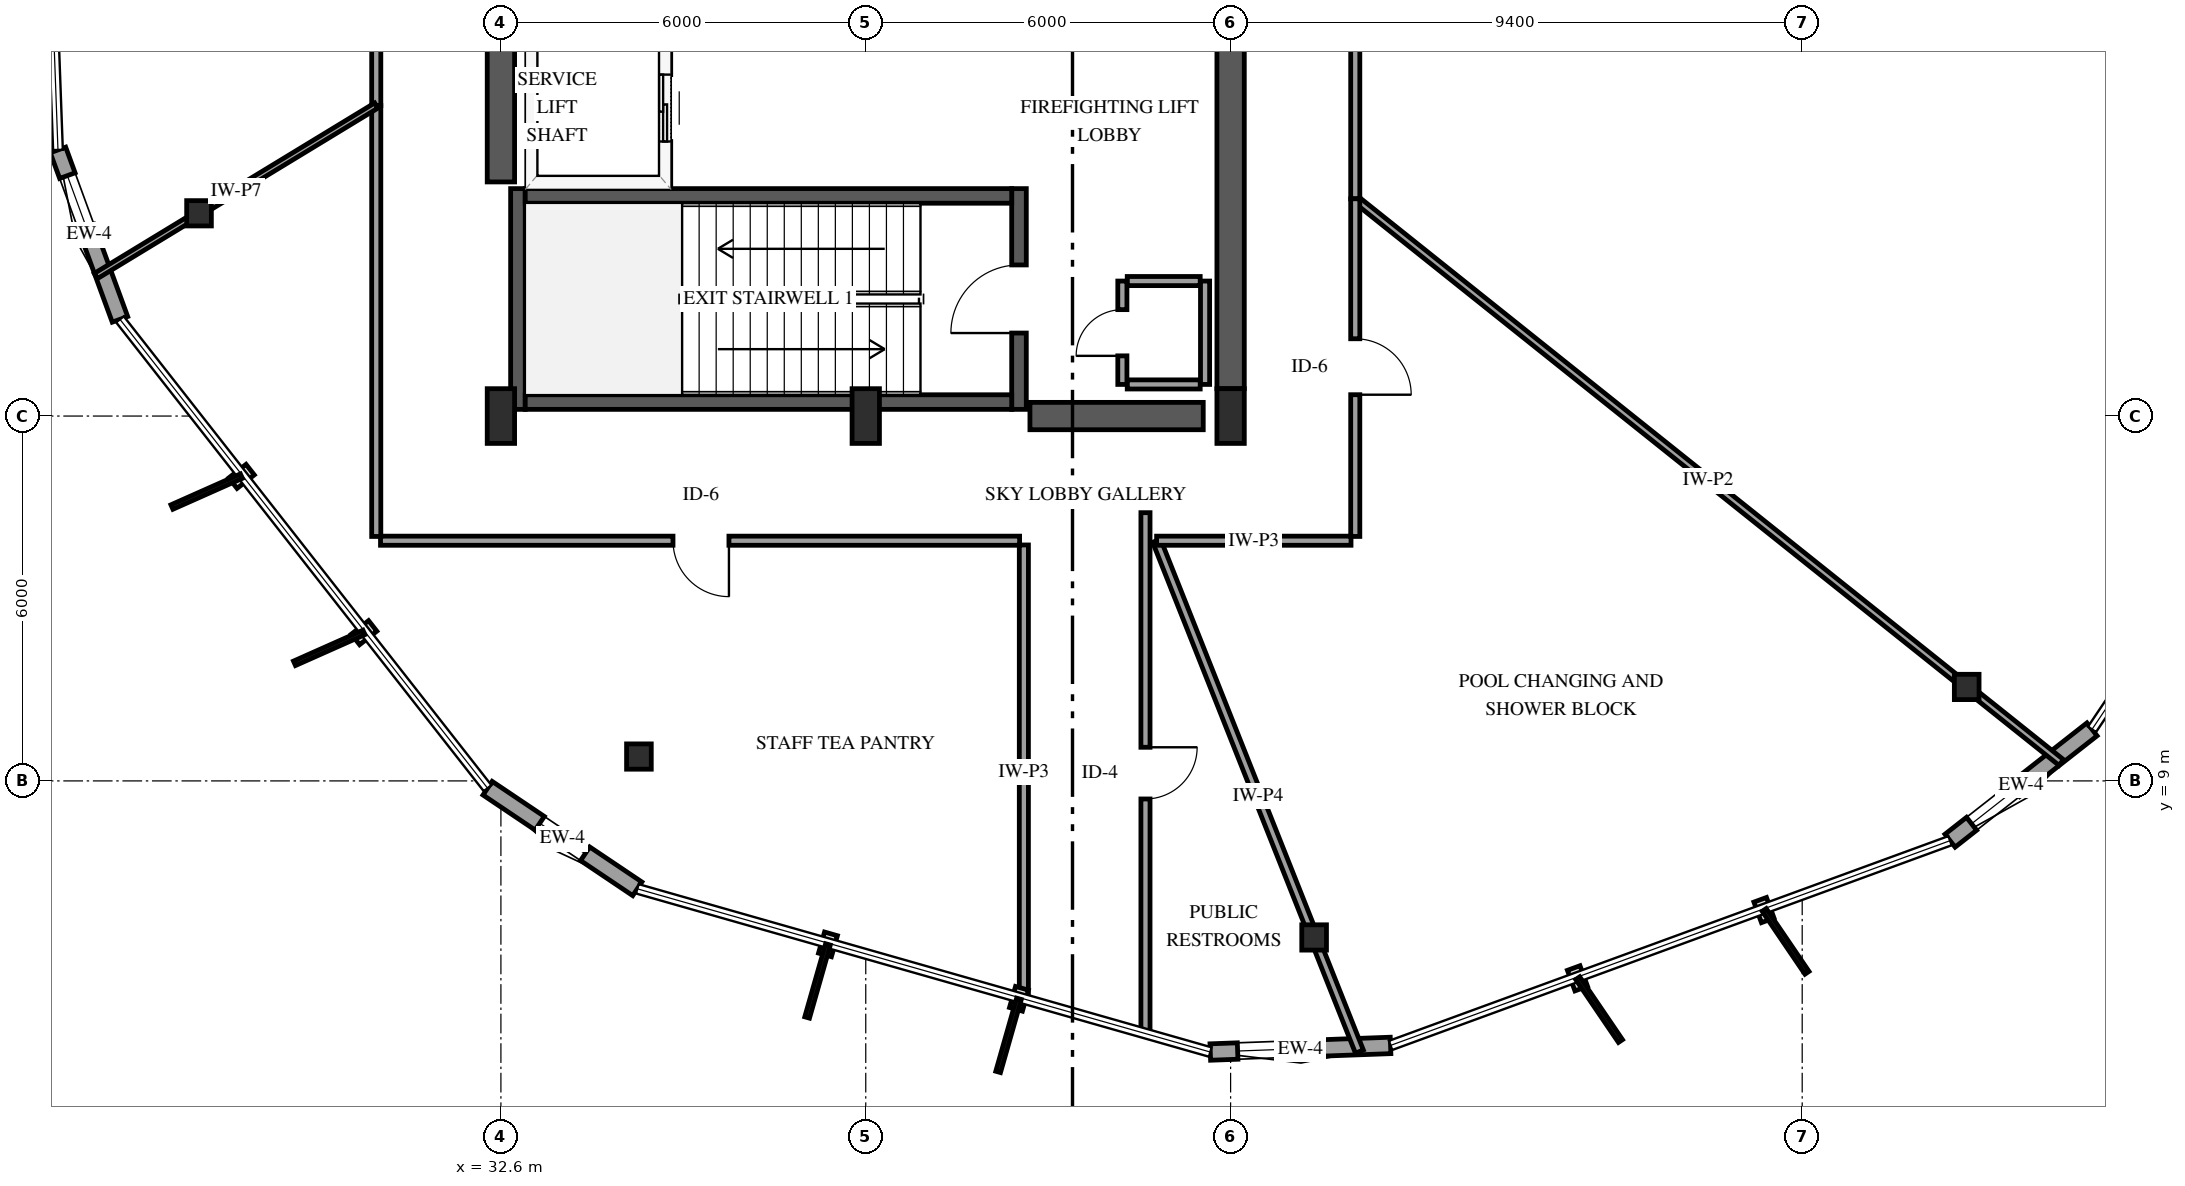
"""IFC4 building model, lengths in metres.
Left out: names, types, materials, properties, quantities, classifications, styles, units other than length and angle.
Written with IfcOpenShell. Run it as: python <this file> out.ifc"""

import sys

from ifc_helpers import new_model, si_unit, direction, frame, frame_2d, origin, origin_2d, place, context, subcontext, project, spatial, rectangle, i_section, extrude, element, fill, save


model = new_model("IFC4")
c1 = context("Model", 3, precision=1e-05, world=origin(), true_north=direction((0.0, 1.0)))
c2 = subcontext(c1, "Body", "Model", "MODEL_VIEW")
j1 = project(units=[si_unit("LENGTHUNIT", "METRE"), si_unit("PLANEANGLEUNIT", "RADIAN")], contexts=[c1])
p1 = place(None, origin())
s1 = spatial("IfcSite", under=j1, at=p1, CompositionType="ELEMENT")
p2 = place(p1, origin())
s2 = spatial("IfcBuilding", under=s1, at=p2, CompositionType="ELEMENT")
p3 = place(p2, frame((0.0, 0.0, 237.4)))
s3 = spatial("IfcBuildingStorey", under=s2, at=p3, CompositionType="ELEMENT", Elevation=237.4)
p4 = place(p3, frame((32.88, 15.11, 0.0), z_axis=(0.0, 0.0, 1.0), x_axis=(0.0, 1.0, 0.0)))
e1 = element("IfcWall", 1, at=p4, inside=s3, PredefinedType="SHEAR", context=c2, shape_type="SweptSolid", body=[
    extrude(rectangle(XDim=3.63, YDim=0.24, at=frame_2d((1.815, 0.0))), origin(), (0.0, 0.0, 1.0), 5.1),
])
p5 = place(p3, frame((41.12, 15.11, 0.0), z_axis=(0.0, 0.0, 1.0), x_axis=(0.0, 1.0, 0.0)))
e2 = element("IfcWall", 2, at=p5, inside=s3, PredefinedType="SHEAR", context=c2, shape_type="SweptSolid", body=[
    extrude(rectangle(XDim=3.63, YDim=0.24, at=frame_2d((1.815, 0.0))), origin(), (0.0, 0.0, 1.0), 5.1),
])
p6 = place(p5, frame((1.255, 0.0, 0.0)))
e3 = element("IfcOpeningElement", 3, at=p6, cuts=e2, PredefinedType="OPENING", context=c2, shape_type="SweptSolid", body=[
    extrude(rectangle(XDim=1.12, YDim=2.15, at=frame_2d((0.56, 1.075))), frame((0.0, 0.13, 0.0), z_axis=(0.0, -1.0, 0.0), x_axis=(1.0, 0.0, 0.0)), (0.0, 0.0, 1.0), 0.26),
])
for number, where, z_axis, x_axis in (
    (4, (33.0, 15.23, 0.0), (0.0, 0.0, 1.0), (1.0, 0.0, 0.0)),
    (5, (33.0, 18.62, 0.0), (0.0, 0.0, 1.0), (1.0, 0.0, 0.0)),
):
    element("IfcWall", number, at=place(p3, frame(where, z_axis=z_axis, x_axis=x_axis)), inside=s3, PredefinedType="SHEAR", context=c2, shape_type="SweptSolid", body=[
        extrude(rectangle(XDim=8.0, YDim=0.24, at=frame_2d((4.0, 0.0))), origin(), (0.0, 0.0, 1.0), 5.1),
    ])
p7 = place(p3, frame((32.6, 18.85, 0.0), z_axis=(0.0, 0.0, 1.0), x_axis=(0.0, 1.0, 0.0)))
e6 = element("IfcWall", 6, at=p7, inside=s3, PredefinedType="SHEAR", context=c2, shape_type="SweptSolid", body=[
    extrude(rectangle(XDim=12.3, YDim=0.45, at=frame_2d((6.15, 0.0))), origin(), (0.0, 0.0, 1.0), 5.1),
])
p8 = place(p3, frame((41.3, 15.0, 0.0), z_axis=(0.0, 0.0, 1.0), x_axis=(1.0, 0.0, 0.0)))
e7 = element("IfcWall", 7, at=p8, inside=s3, PredefinedType="SHEAR", context=c2, shape_type="SweptSolid", body=[
    extrude(rectangle(XDim=2.85, YDim=0.45, at=frame_2d((1.425, 0.0))), origin(), (0.0, 0.0, 1.0), 5.1),
])
p9 = place(p3, frame((44.6, 15.45, 0.0), z_axis=(0.0, 0.0, 1.0), x_axis=(0.0, 1.0, 0.0)))
e8 = element("IfcWall", 8, at=p9, inside=s3, PredefinedType="SHEAR", context=c2, shape_type="SweptSolid", body=[
    extrude(rectangle(XDim=6.35, YDim=0.45, at=frame_2d((3.175, 0.0))), origin(), (0.0, 0.0, 1.0), 5.1),
])
for number, where, z_axis, x_axis in (
    (9, (32.6, 15.0, 0.0), (0.0, 0.0, 1.0), (1.0, 0.0, 0.0)),
    (10, (38.6, 15.0, 0.0), (0.0, 0.0, 1.0), (1.0, 0.0, 0.0)),
    (11, (44.6, 15.0, 0.0), (0.0, 0.0, 1.0), (1.0, 0.0, 0.0)),
):
    element("IfcColumn", number, at=place(p3, frame(where, z_axis=z_axis, x_axis=x_axis)), inside=s3, PredefinedType="PILASTER", context=c2, shape_type="SweptSolid", body=[
        extrude(rectangle(XDim=0.45, YDim=0.9, at=origin_2d()), origin(), (0.0, 0.0, 1.0), 4.8),
    ])
for number, where, z_axis, x_axis in (
    (12, (27.635, 18.334, 0.0), (0.0, 0.0, 1.0), (1.0, 0.0, 0.0)),
    (13, (34.87, 9.401, 0.0), (0.0, 0.0, 1.0), (1.0, 0.0, 0.0)),
    (14, (45.973, 6.426, 0.0), (0.0, 0.0, 1.0), (1.0, 0.0, 0.0)),
    (15, (56.705, 10.545, 0.0), (0.0, 0.0, 1.0), (1.0, 0.0, 0.0)),
):
    element("IfcColumn", number, at=place(p3, frame(where, z_axis=z_axis, x_axis=x_axis)), inside=s3, PredefinedType="COLUMN", context=c2, shape_type="SweptSolid", body=[
        extrude(i_section(OverallWidth=0.406, OverallDepth=0.416, WebThickness=0.03, FlangeThickness=0.048, FilletRadius=0.038, at=origin_2d()), origin(), (0.0, 0.0, 1.0), 4.8),
    ])
p10 = place(p3, frame((25.316, 19.376, 0.0), z_axis=(0.0, 0.0, 1.0), x_axis=(0.343572680233, -0.939126090255, 0.0)))
e16 = element("IfcWall", 16, at=p10, inside=s3, PredefinedType="SOLIDWALL", context=c2, shape_type="SweptSolid", body=[
    extrude(rectangle(XDim=2.967, YDim=0.27, at=frame_2d((1.483, 0.0))), origin(), (0.0, 0.0, 1.0), 4.179),
])
p11 = place(p10, frame((0.45, 0.0, 0.75)))
e17 = element("IfcOpeningElement", 17, at=p11, cuts=e16, PredefinedType="OPENING", context=c2, shape_type="SweptSolid", body=[
    extrude(rectangle(XDim=0.9, YDim=1.5, at=frame_2d((0.45, 0.75))), frame((0.0, 0.145, 0.0), z_axis=(0.0, -1.0, 0.0), x_axis=(1.0, 0.0, 0.0)), (0.0, 0.0, 1.0), 0.29),
])
p12 = place(p3, frame((32.381, 8.88, 0.0), z_axis=(0.0, 0.0, 1.0), x_axis=(0.830006141752, -0.557754251131, 0.0)))
e18 = element("IfcWall", 18, at=p12, inside=s3, PredefinedType="SOLIDWALL", context=c2, shape_type="SweptSolid", body=[
    extrude(rectangle(XDim=2.967, YDim=0.27, at=frame_2d((1.483, 0.0))), origin(), (0.0, 0.0, 1.0), 4.179),
])
p13 = place(p12, frame((1.033, 0.0, 0.75)))
e19 = element("IfcOpeningElement", 19, at=p13, cuts=e18, PredefinedType="OPENING", context=c2, shape_type="SweptSolid", body=[
    extrude(rectangle(XDim=0.9, YDim=1.5, at=frame_2d((0.45, 0.75))), frame((0.0, 0.145, 0.0), z_axis=(0.0, -1.0, 0.0), x_axis=(1.0, 0.0, 0.0)), (0.0, 0.0, 1.0), 0.29),
])
p14 = place(p3, frame((44.266, 4.541, 0.0), z_axis=(0.0, 0.0, 1.0), x_axis=(0.999329187927, 0.036622044686, 0.0)))
e20 = element("IfcWall", 20, at=p14, inside=s3, PredefinedType="SOLIDWALL", context=c2, shape_type="SweptSolid", body=[
    extrude(rectangle(XDim=2.967, YDim=0.27, at=frame_2d((1.483, 0.0))), origin(), (0.0, 0.0, 1.0), 4.179),
])
p15 = place(p14, frame((0.45, 0.0, 0.75)))
e21 = element("IfcOpeningElement", 21, at=p15, cuts=e20, PredefinedType="OPENING", context=c2, shape_type="SweptSolid", body=[
    extrude(rectangle(XDim=0.9, YDim=1.5, at=frame_2d((0.45, 0.75))), frame((0.0, 0.145, 0.0), z_axis=(0.0, -1.0, 0.0), x_axis=(1.0, 0.0, 0.0)), (0.0, 0.0, 1.0), 0.29),
])
p16 = place(p3, frame((56.431, 8.017, 0.0), z_axis=(0.0, 0.0, 1.0), x_axis=(0.78691766732, 0.617058007694, 0.0)))
e22 = element("IfcWall", 22, at=p16, inside=s3, PredefinedType="SOLIDWALL", context=c2, shape_type="SweptSolid", body=[
    extrude(rectangle(XDim=2.967, YDim=0.27, at=frame_2d((1.483, 0.0))), origin(), (0.0, 0.0, 1.0), 4.179),
])
p17 = place(p16, frame((0.45, 0.0, 0.75)))
e23 = element("IfcOpeningElement", 23, at=p17, cuts=e22, PredefinedType="OPENING", context=c2, shape_type="SweptSolid", body=[
    extrude(rectangle(XDim=0.9, YDim=1.5, at=frame_2d((0.45, 0.75))), frame((0.0, 0.145, 0.0), z_axis=(0.0, -1.0, 0.0), x_axis=(1.0, 0.0, 0.0)), (0.0, 0.0, 1.0), 0.29),
])
p18 = place(p3, frame((35.3, 18.79, 0.0), z_axis=(0.0, 0.0, 1.0), x_axis=(0.0, 1.0, 0.0)))
e24 = element("IfcWall", 24, at=p18, inside=s3, PredefinedType="SOLIDWALL", context=c2, shape_type="SweptSolid", body=[
    extrude(rectangle(XDim=2.55, YDim=0.185, at=frame_2d((1.275, 0.0))), origin(), (0.0, 0.0, 1.0), 4.8),
])
p19 = place(p18, frame((0.725, 0.0, 0.0)))
e25 = element("IfcOpeningElement", 25, at=p19, cuts=e24, PredefinedType="OPENING", context=c2, shape_type="SweptSolid", body=[
    extrude(rectangle(XDim=1.1, YDim=2.15, at=frame_2d((0.55, 1.075))), frame((0.0, 0.103, 0.0), z_axis=(0.0, -1.0, 0.0), x_axis=(1.0, 0.0, 0.0)), (0.0, 0.0, 1.0), 0.205),
])
for number, where, z_axis, x_axis in (
    (26, (42.9, 15.52, 0.0), (0.0, 0.0, 1.0), (1.0, 0.0, 0.0)),
    (27, (42.9, 17.22, 0.0), (0.0, 0.0, 1.0), (1.0, 0.0, 0.0)),
):
    element("IfcWall", number, at=place(p3, frame(where, z_axis=z_axis, x_axis=x_axis)), inside=s3, PredefinedType="PARTITIONING", context=c2, shape_type="SweptSolid", body=[
        extrude(rectangle(XDim=1.2, YDim=0.15, at=frame_2d((0.6, 0.0))), origin(), (0.0, 0.0, 1.0), 4.8),
    ])
p20 = place(p3, frame((44.18, 15.52, 0.0), z_axis=(0.0, 0.0, 1.0), x_axis=(0.0, 1.0, 0.0)))
e28 = element("IfcWall", 28, at=p20, inside=s3, PredefinedType="PARTITIONING", context=c2, shape_type="SweptSolid", body=[
    extrude(rectangle(XDim=1.7, YDim=0.15, at=frame_2d((0.85, 0.0))), origin(), (0.0, 0.0, 1.0), 4.8),
])
p21 = place(p3, frame((42.82, 15.52, 0.0), z_axis=(0.0, 0.0, 1.0), x_axis=(0.0, 1.0, 0.0)))
e29 = element("IfcWall", 29, at=p21, inside=s3, PredefinedType="PARTITIONING", context=c2, shape_type="SweptSolid", body=[
    extrude(rectangle(XDim=1.7, YDim=0.15, at=frame_2d((0.85, 0.0))), origin(), (0.0, 0.0, 1.0), 4.8),
])
p22 = place(p21, frame((0.47, 0.0, 0.0)))
e30 = element("IfcOpeningElement", 30, at=p22, cuts=e29, PredefinedType="OPENING", context=c2, shape_type="SweptSolid", body=[
    extrude(rectangle(XDim=0.76, YDim=2.0, at=frame_2d((0.38, 1.0))), frame((0.0, 0.085, 0.0), z_axis=(0.0, -1.0, 0.0), x_axis=(1.0, 0.0, 0.0)), (0.0, 0.0, 1.0), 0.17),
])
p23 = place(p3, frame((30.55, 20.106, 0.0), z_axis=(0.0, 0.0, 1.0), x_axis=(0.0, 1.0, 0.0)))
e31 = element("IfcWall", 31, at=p23, inside=s3, PredefinedType="PARTITIONING", context=c2, shape_type="SweptSolid", body=[
    extrude(rectangle(XDim=16.874, YDim=0.15, at=frame_2d((8.437, 0.0))), origin(), (0.0, 0.0, 1.0), 4.8),
])
p24 = place(p23, frame((7.962, 0.0, 0.0)))
e32 = element("IfcOpeningElement", 32, at=p24, cuts=e31, PredefinedType="OPENING", context=c2, shape_type="SweptSolid", body=[
    extrude(rectangle(XDim=0.92, YDim=2.12, at=frame_2d((0.46, 1.06))), frame((0.0, 0.085, 0.0), z_axis=(0.0, -1.0, 0.0), x_axis=(1.0, 0.0, 0.0)), (0.0, 0.0, 1.0), 0.17),
])
p25 = place(p3, frame((46.65, 18.573, 0.0), z_axis=(0.0, 0.0, 1.0), x_axis=(0.781461641281, -0.623953286078, 0.0)))
e33 = element("IfcWall", 33, at=p25, inside=s3, PredefinedType="PARTITIONING", context=c2, shape_type="SweptSolid", body=[
    extrude(rectangle(XDim=14.857, YDim=0.12, at=frame_2d((7.428, 0.0))), origin(), (0.0, 0.0, 1.0), 3.09),
])
p26 = place(p3, frame((41.13, 12.95, 0.0), z_axis=(0.0, 0.0, 1.0), x_axis=(-1.0, 0.0, 0.0)))
e34 = element("IfcWall", 34, at=p26, inside=s3, PredefinedType="PARTITIONING", context=c2, shape_type="SweptSolid", body=[
    extrude(rectangle(XDim=10.51, YDim=0.15, at=frame_2d((5.255, 0.0))), origin(), (0.0, 0.0, 1.0), 4.8),
])
p27 = place(p26, frame((4.78, 0.0, 0.0)))
e35 = element("IfcOpeningElement", 35, at=p27, cuts=e34, PredefinedType="OPENING", context=c2, shape_type="SweptSolid", body=[
    extrude(rectangle(XDim=0.92, YDim=2.12, at=frame_2d((0.46, 1.06))), frame((0.0, 0.085, 0.0), z_axis=(0.0, -1.0, 0.0), x_axis=(1.0, 0.0, 0.0)), (0.0, 0.0, 1.0), 0.17),
])
p28 = place(p3, frame((43.383, 12.95, 0.0), z_axis=(0.0, 0.0, 1.0), x_axis=(0.368967753702, -0.92944219655, 0.0)))
e36 = element("IfcWall", 36, at=p28, inside=s3, PredefinedType="PARTITIONING", context=c2, shape_type="SweptSolid", body=[
    extrude(rectangle(XDim=9.039, YDim=0.14, at=frame_2d((4.519, 0.0))), origin(), (0.0, 0.0, 1.0), 3.09),
])
p29 = place(p3, frame((46.65, 27.258, 0.0), z_axis=(0.0, 0.0, 1.0), x_axis=(0.0, -1.0, 0.0)))
e37 = element("IfcWall", 37, at=p29, inside=s3, PredefinedType="PARTITIONING", context=c2, shape_type="SweptSolid", body=[
    extrude(rectangle(XDim=8.685, YDim=0.15, at=frame_2d((4.343, 0.0))), origin(), (0.0, 0.0, 1.0), 4.8),
])
p30 = place(p29, frame((3.867, 0.0, 0.0)))
e38 = element("IfcOpeningElement", 38, at=p30, cuts=e37, PredefinedType="OPENING", context=c2, shape_type="SweptSolid", body=[
    extrude(rectangle(XDim=0.92, YDim=2.12, at=frame_2d((0.46, 1.06))), frame((0.0, 0.085, 0.0), z_axis=(0.0, -1.0, 0.0), x_axis=(1.0, 0.0, 0.0)), (0.0, 0.0, 1.0), 0.17),
])
p31 = place(p3, frame((41.2, 5.415, 0.0), z_axis=(0.0, 0.0, 1.0), x_axis=(0.0, 1.0, 0.0)))
e39 = element("IfcWall", 39, at=p31, inside=s3, PredefinedType="PARTITIONING", context=c2, shape_type="SweptSolid", body=[
    extrude(rectangle(XDim=7.465, YDim=0.15, at=frame_2d((3.732, 0.0))), origin(), (0.0, 0.0, 1.0), 4.8),
])
p32 = place(p3, frame((30.55, 13.02, 0.0), z_axis=(0.0, 0.0, 1.0), x_axis=(0.0, 1.0, 0.0)))
e40 = element("IfcWall", 40, at=p32, inside=s3, PredefinedType="PARTITIONING", context=c2, shape_type="SweptSolid", body=[
    extrude(rectangle(XDim=7.086, YDim=0.15, at=frame_2d((3.543, 0.0))), origin(), (0.0, 0.0, 1.0), 4.8),
])
p33 = place(p3, frame((46.65, 18.573, 0.0), z_axis=(0.0, 0.0, 1.0), x_axis=(0.0, -1.0, 0.0)))
e41 = element("IfcWall", 41, at=p33, inside=s3, PredefinedType="PARTITIONING", context=c2, shape_type="SweptSolid", body=[
    extrude(rectangle(XDim=5.553, YDim=0.15, at=frame_2d((2.776, 0.0))), origin(), (0.0, 0.0, 1.0), 4.8),
])
p34 = place(p33, frame((2.302, 0.0, 0.0)))
e42 = element("IfcOpeningElement", 42, at=p34, cuts=e41, PredefinedType="OPENING", context=c2, shape_type="SweptSolid", body=[
    extrude(rectangle(XDim=0.92, YDim=2.12, at=frame_2d((0.46, 1.06))), frame((0.0, 0.085, 0.0), z_axis=(0.0, -1.0, 0.0), x_axis=(1.0, 0.0, 0.0)), (0.0, 0.0, 1.0), 0.17),
])
p35 = place(p3, frame((30.55, 20.106, 0.0), z_axis=(0.0, 0.0, 1.0), x_axis=(-0.854508553668, -0.519437322214, 0.0)))
e43 = element("IfcWall", 43, at=p35, inside=s3, PredefinedType="PARTITIONING", context=c2, shape_type="SweptSolid", body=[
    extrude(rectangle(XDim=5.396, YDim=0.1, at=frame_2d((2.698, 0.0))), origin(), (0.0, 0.0, 1.0), 4.8),
])
p36 = place(p3, frame((46.58, 12.95, 0.0), z_axis=(0.0, 0.0, 1.0), x_axis=(-1.0, 0.0, 0.0)))
e44 = element("IfcWall", 44, at=p36, inside=s3, PredefinedType="PARTITIONING", context=c2, shape_type="SweptSolid", body=[
    extrude(rectangle(XDim=3.197, YDim=0.15, at=frame_2d((1.599, 0.0))), origin(), (0.0, 0.0, 1.0), 4.8),
])
p37 = place(p3, frame((43.2, 13.411, 0.0), z_axis=(0.0, 0.0, 1.0), x_axis=(0.0, -1.0, 0.0)))
e45 = element("IfcWall", 45, at=p37, inside=s3, PredefinedType="PARTITIONING", context=c2, shape_type="SweptSolid", body=[
    extrude(rectangle(XDim=8.566, YDim=0.15, at=frame_2d((4.283, 0.0))), origin(), (0.0, 0.0, 1.0), 3.851),
])
p38 = place(p37, frame((3.858, 0.0, 0.0)))
e46 = element("IfcOpeningElement", 46, at=p38, cuts=e45, PredefinedType="OPENING", context=c2, shape_type="SweptSolid", body=[
    extrude(rectangle(XDim=0.85, YDim=2.1, at=frame_2d((0.425, 1.05))), frame((0.0, 0.085, 0.0), z_axis=(0.0, -1.0, 0.0), x_axis=(1.0, 0.0, 0.0)), (0.0, 0.0, 1.0), 0.17),
])
p39 = place(p11, origin())
e47 = element("IfcWindow", 47, at=p39, inside=s3, PartitioningType="SINGLE_PANEL", PredefinedType="WINDOW", context=c2, shape_type="SweptSolid", body=[
    extrude(rectangle(XDim=0.9, YDim=1.5, at=frame_2d((0.45, 0.75))), frame((0.0, 0.03, 0.0), z_axis=(0.0, -1.0, 0.0), x_axis=(1.0, 0.0, 0.0)), (0.0, 0.0, 1.0), 0.06),
])
fill(e17, e47)
p40 = place(p13, origin())
e48 = element("IfcWindow", 48, at=p40, inside=s3, PartitioningType="SINGLE_PANEL", PredefinedType="WINDOW", context=c2, shape_type="SweptSolid", body=[
    extrude(rectangle(XDim=0.9, YDim=1.5, at=frame_2d((0.45, 0.75))), frame((0.0, 0.03, 0.0), z_axis=(0.0, -1.0, 0.0), x_axis=(1.0, 0.0, 0.0)), (0.0, 0.0, 1.0), 0.06),
])
fill(e19, e48)
p41 = place(p15, origin())
e49 = element("IfcWindow", 49, at=p41, inside=s3, PartitioningType="SINGLE_PANEL", PredefinedType="WINDOW", context=c2, shape_type="SweptSolid", body=[
    extrude(rectangle(XDim=0.9, YDim=1.5, at=frame_2d((0.45, 0.75))), frame((0.0, 0.03, 0.0), z_axis=(0.0, -1.0, 0.0), x_axis=(1.0, 0.0, 0.0)), (0.0, 0.0, 1.0), 0.06),
])
fill(e21, e49)
p42 = place(p17, origin())
e50 = element("IfcWindow", 50, at=p42, inside=s3, PartitioningType="SINGLE_PANEL", PredefinedType="WINDOW", context=c2, shape_type="SweptSolid", body=[
    extrude(rectangle(XDim=0.9, YDim=1.5, at=frame_2d((0.45, 0.75))), frame((0.0, 0.03, 0.0), z_axis=(0.0, -1.0, 0.0), x_axis=(1.0, 0.0, 0.0)), (0.0, 0.0, 1.0), 0.06),
])
fill(e23, e50)
p43 = place(p19, origin())
e51 = element("IfcDoor", 51, at=p43, inside=s3, OperationType="SLIDING_TO_LEFT", PredefinedType="DOOR", context=c2, shape_type="SweptSolid", body=[
    extrude(rectangle(XDim=1.1, YDim=2.15, at=frame_2d((0.55, 1.075))), frame((0.0, 0.025, 0.0), z_axis=(0.0, -1.0, 0.0), x_axis=(1.0, 0.0, 0.0)), (0.0, 0.0, 1.0), 0.05),
])
fill(e25, e51)
p44 = place(p6, origin())
e52 = element("IfcDoor", 52, at=p44, inside=s3, OperationType="SINGLE_SWING_LEFT", PredefinedType="DOOR", context=c2, shape_type="SweptSolid", body=[
    extrude(rectangle(XDim=1.12, YDim=2.15, at=frame_2d((0.56, 1.075))), frame((0.0, 0.025, 0.0), z_axis=(0.0, -1.0, 0.0), x_axis=(1.0, 0.0, 0.0)), (0.0, 0.0, 1.0), 0.05),
])
fill(e3, e52)
p45 = place(p22, origin())
e53 = element("IfcDoor", 53, at=p45, inside=s3, OperationType="SINGLE_SWING_LEFT", PredefinedType="TRAPDOOR", context=c2, shape_type="SweptSolid", body=[
    extrude(rectangle(XDim=0.76, YDim=2.0, at=frame_2d((0.38, 1.0))), frame((0.0, 0.025, 0.0), z_axis=(0.0, -1.0, 0.0), x_axis=(1.0, 0.0, 0.0)), (0.0, 0.0, 1.0), 0.05),
])
fill(e30, e53)
p46 = place(p27, origin())
e54 = element("IfcDoor", 54, at=p46, inside=s3, OperationType="SINGLE_SWING_LEFT", PredefinedType="DOOR", context=c2, shape_type="SweptSolid", body=[
    extrude(rectangle(XDim=0.92, YDim=2.12, at=frame_2d((0.46, 1.06))), frame((0.0, 0.025, 0.0), z_axis=(0.0, -1.0, 0.0), x_axis=(1.0, 0.0, 0.0)), (0.0, 0.0, 1.0), 0.05),
])
fill(e35, e54)
p47 = place(p34, origin())
e55 = element("IfcDoor", 55, at=p47, inside=s3, OperationType="SINGLE_SWING_RIGHT", PredefinedType="DOOR", context=c2, shape_type="SweptSolid", body=[
    extrude(rectangle(XDim=0.92, YDim=2.12, at=frame_2d((0.46, 1.06))), frame((0.0, 0.025, 0.0), z_axis=(0.0, -1.0, 0.0), x_axis=(1.0, 0.0, 0.0)), (0.0, 0.0, 1.0), 0.05),
])
fill(e42, e55)
p48 = place(p38, origin())
e56 = element("IfcDoor", 56, at=p48, inside=s3, OperationType="SINGLE_SWING_LEFT", PredefinedType="DOOR", context=c2, shape_type="SweptSolid", body=[
    extrude(rectangle(XDim=0.85, YDim=2.1, at=frame_2d((0.425, 1.05))), frame((0.0, 0.025, 0.0), z_axis=(0.0, -1.0, 0.0), x_axis=(1.0, 0.0, 0.0)), (0.0, 0.0, 1.0), 0.05),
])
fill(e46, e56)
save(model, sys.argv[1])
